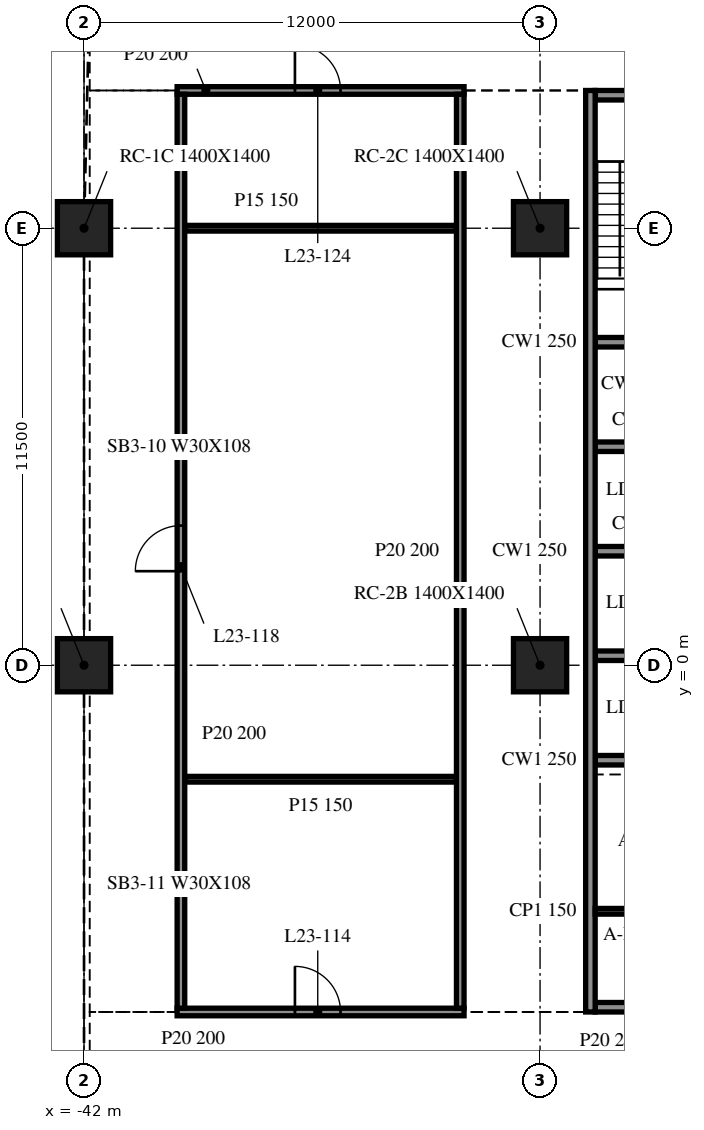
"""IFC4 building model, lengths in metres.
Left out: names, types, materials, properties, quantities, classifications, styles, units other than length and angle.
Written with IfcOpenShell. Run it as: python <this file> out.ifc"""

import sys

from ifc_helpers import new_model, si_unit, direction, frame, frame_2d, origin, origin_2d, place, context, subcontext, project, spatial, rectangle, extrude, element, fill, save


model = new_model("IFC4")
c1 = context("Model", 3, precision=1e-05, world=origin(), true_north=direction((0.0, 1.0)))
c2 = subcontext(c1, "Body", "Model", "MODEL_VIEW")
j1 = project(units=[si_unit("LENGTHUNIT", "METRE"), si_unit("PLANEANGLEUNIT", "RADIAN")], contexts=[c1])
p1 = place(None, origin())
s1 = spatial("IfcSite", under=j1, at=p1, CompositionType="ELEMENT")
p2 = place(p1, origin())
s2 = spatial("IfcBuilding", under=s1, at=p2, CompositionType="ELEMENT")
p3 = place(p2, frame((0.0, 0.0, 101.2)))
s3 = spatial("IfcBuildingStorey", under=s2, at=p3, CompositionType="ELEMENT", Elevation=101.2)
for number, where, z_axis, x_axis in (
    (1, (-42.0, 0.0, -0.34), (0.0, 0.0, 1.0), (1.0, 0.0, 0.0)),
    (2, (-42.0, 11.5, -0.34), (0.0, 0.0, 1.0), (1.0, 0.0, 0.0)),
    (3, (-30.0, 0.0, -0.34), (0.0, 0.0, 1.0), (1.0, 0.0, 0.0)),
    (4, (-30.0, 11.5, -0.34), (0.0, 0.0, 1.0), (1.0, 0.0, 0.0)),
):
    element("IfcColumn", number, at=place(p3, frame(where, z_axis=z_axis, x_axis=x_axis)), inside=s3, PredefinedType="COLUMN", context=c2, shape_type="SweptSolid", body=[
        extrude(rectangle(XDim=1.4, YDim=1.4, at=origin_2d()), origin(), (0.0, 0.0, 1.0), 4.1),
    ])
p4 = place(p3, frame((-28.675, 15.125, 0.0), z_axis=(0.0, 0.0, 1.0), x_axis=(0.0, -1.0, 0.0)))
e5 = element("IfcWall", 5, at=p4, inside=s3, PredefinedType="SOLIDWALL", context=c2, shape_type="SweptSolid", body=[
    extrude(rectangle(XDim=24.25, YDim=0.25, at=frame_2d((12.125, 0.0))), origin(), (0.0, 0.0, 1.0), 3.76),
])
p5 = place(p3, frame((-19.45, -9.0, 0.0), z_axis=(0.0, 0.0, 1.0), x_axis=(-1.0, 0.0, 0.0)))
e6 = element("IfcWall", 6, at=p5, inside=s3, PredefinedType="SOLIDWALL", context=c2, shape_type="SweptSolid", body=[
    extrude(rectangle(XDim=9.1, YDim=0.25, at=frame_2d((4.55, 0.0))), origin(), (0.0, 0.0, 1.0), 3.76),
])
p6 = place(p5, frame((3.65, 0.0, 0.0)))
e7 = element("IfcOpeningElement", 7, at=p6, cuts=e6, PredefinedType="OPENING", context=c2, shape_type="SweptSolid", body=[
    extrude(rectangle(XDim=1.8, YDim=2.1, at=frame_2d((0.9, 1.05))), frame((0.0, 0.135, 0.0), z_axis=(0.0, -1.0, 0.0), x_axis=(1.0, 0.0, 0.0)), (0.0, 0.0, 1.0), 0.27),
])
p7 = place(p3, frame((-28.55, 15.0, 0.0), z_axis=(0.0, 0.0, 1.0), x_axis=(1.0, 0.0, 0.0)))
e8 = element("IfcWall", 8, at=p7, inside=s3, PredefinedType="SOLIDWALL", context=c2, shape_type="SweptSolid", body=[
    extrude(rectangle(XDim=9.1, YDim=0.25, at=frame_2d((4.55, 0.0))), origin(), (0.0, 0.0, 1.0), 3.76),
])
p8 = place(p7, frame((3.65, 0.0, 0.0)))
e9 = element("IfcOpeningElement", 9, at=p8, cuts=e8, PredefinedType="OPENING", context=c2, shape_type="SweptSolid", body=[
    extrude(rectangle(XDim=1.8, YDim=2.1, at=frame_2d((0.9, 1.05))), frame((0.0, 0.135, 0.0), z_axis=(0.0, -1.0, 0.0), x_axis=(1.0, 0.0, 0.0)), (0.0, 0.0, 1.0), 0.27),
])
for number, where, z_axis, x_axis in (
    (10, (-28.55, -2.5, 0.0), (0.0, 0.0, 1.0), (1.0, 0.0, 0.0)),
    (11, (-28.55, 0.25, 0.0), (0.0, 0.0, 1.0), (1.0, 0.0, 0.0)),
    (12, (-28.55, 3.0, 0.0), (0.0, 0.0, 1.0), (1.0, 0.0, 0.0)),
    (13, (-28.55, 5.75, 0.0), (0.0, 0.0, 1.0), (1.0, 0.0, 0.0)),
    (14, (-28.55, 8.5, 0.0), (0.0, 0.0, 1.0), (1.0, 0.0, 0.0)),
):
    element("IfcWall", number, at=place(p3, frame(where, z_axis=z_axis, x_axis=x_axis)), inside=s3, PredefinedType="SOLIDWALL", context=c2, shape_type="SweptSolid", body=[
        extrude(rectangle(XDim=2.85, YDim=0.25, at=frame_2d((1.425, 0.0))), origin(), (0.0, 0.0, 1.0), 3.76),
    ])
p9 = place(p3, frame((-28.55, -6.475, 0.0), z_axis=(0.0, 0.0, 1.0), x_axis=(1.0, 0.0, 0.0)))
e15 = element("IfcWall", 15, at=p9, inside=s3, PredefinedType="PARTITIONING", context=c2, shape_type="SweptSolid", body=[
    extrude(rectangle(XDim=2.85, YDim=0.15, at=frame_2d((1.425, 0.0))), origin(), (0.0, 0.0, 1.0), 3.76),
])
p10 = place(p3, frame((-39.55, -9.125, 0.0), z_axis=(0.0, 0.0, 1.0), x_axis=(1.0, 0.0, 0.0)))
e16 = element("IfcWall", 16, at=p10, inside=s3, PredefinedType="PARTITIONING", context=c2, shape_type="SweptSolid", body=[
    extrude(rectangle(XDim=7.55, YDim=0.2, at=frame_2d((3.775, 0.0))), origin(), (0.0, 0.0, 1.0), 3.76),
])
p11 = place(p10, frame((3.1, 0.0, 0.0)))
e17 = element("IfcOpeningElement", 17, at=p11, cuts=e16, PredefinedType="OPENING", context=c2, shape_type="SweptSolid", body=[
    extrude(rectangle(XDim=1.2, YDim=2.1, at=frame_2d((0.6, 1.05))), frame((0.0, 0.11, 0.0), z_axis=(0.0, -1.0, 0.0), x_axis=(1.0, 0.0, 0.0)), (0.0, 0.0, 1.0), 0.22),
])
for number, where, z_axis, x_axis in (
    (18, (-39.35, -3.0, 0.0), (0.0, 0.0, 1.0), (1.0, 0.0, 0.0)),
    (19, (-39.35, 11.5, 0.0), (0.0, 0.0, 1.0), (1.0, 0.0, 0.0)),
):
    element("IfcWall", number, at=place(p3, frame(where, z_axis=z_axis, x_axis=x_axis)), inside=s3, PredefinedType="PARTITIONING", context=c2, shape_type="SweptSolid", body=[
        extrude(rectangle(XDim=7.15, YDim=0.15, at=frame_2d((3.575, 0.0))), origin(), (0.0, 0.0, 1.0), 3.76),
    ])
p12 = place(p3, frame((-39.55, 15.125, 0.0), z_axis=(0.0, 0.0, 1.0), x_axis=(1.0, 0.0, 0.0)))
e20 = element("IfcWall", 20, at=p12, inside=s3, PredefinedType="PARTITIONING", context=c2, shape_type="SweptSolid", body=[
    extrude(rectangle(XDim=7.55, YDim=0.2, at=frame_2d((3.775, 0.0))), origin(), (0.0, 0.0, 1.0), 3.76),
])
p13 = place(p12, frame((3.1, 0.0, 0.0)))
e21 = element("IfcOpeningElement", 21, at=p13, cuts=e20, PredefinedType="OPENING", context=c2, shape_type="SweptSolid", body=[
    extrude(rectangle(XDim=1.2, YDim=2.1, at=frame_2d((0.6, 1.05))), frame((0.0, 0.11, 0.0), z_axis=(0.0, -1.0, 0.0), x_axis=(1.0, 0.0, 0.0)), (0.0, 0.0, 1.0), 0.22),
])
p14 = place(p3, frame((-39.45, -9.025, 0.0), z_axis=(0.0, 0.0, 1.0), x_axis=(0.0, 1.0, 0.0)))
e22 = element("IfcWall", 22, at=p14, inside=s3, PredefinedType="PARTITIONING", context=c2, shape_type="SweptSolid", body=[
    extrude(rectangle(XDim=24.05, YDim=0.2, at=frame_2d((12.025, 0.0))), origin(), (0.0, 0.0, 1.0), 3.76),
])
p15 = place(p14, frame((11.5, 0.0, 0.0)))
e23 = element("IfcOpeningElement", 23, at=p15, cuts=e22, PredefinedType="OPENING", context=c2, shape_type="SweptSolid", body=[
    extrude(rectangle(XDim=1.2, YDim=2.1, at=frame_2d((0.6, 1.05))), frame((0.0, 0.11, 0.0), z_axis=(0.0, -1.0, 0.0), x_axis=(1.0, 0.0, 0.0)), (0.0, 0.0, 1.0), 0.22),
])
p16 = place(p3, frame((-32.1, -9.025, 0.0), z_axis=(0.0, 0.0, 1.0), x_axis=(0.0, 1.0, 0.0)))
e24 = element("IfcWall", 24, at=p16, inside=s3, PredefinedType="PARTITIONING", context=c2, shape_type="SweptSolid", body=[
    extrude(rectangle(XDim=24.05, YDim=0.2, at=frame_2d((12.025, 0.0))), origin(), (0.0, 0.0, 1.0), 3.76),
])
p17 = place(p11, origin())
e25 = element("IfcDoor", 25, at=p17, inside=s3, OperationType="SINGLE_SWING_LEFT", PredefinedType="DOOR", context=c2, shape_type="SweptSolid", body=[
    extrude(rectangle(XDim=1.2, YDim=2.1, at=frame_2d((0.6, 1.05))), frame((0.0, 0.025, 0.0), z_axis=(0.0, -1.0, 0.0), x_axis=(1.0, 0.0, 0.0)), (0.0, 0.0, 1.0), 0.05),
])
fill(e17, e25)
p18 = place(p15, origin())
e26 = element("IfcDoor", 26, at=p18, inside=s3, OperationType="SINGLE_SWING_LEFT", PredefinedType="DOOR", context=c2, shape_type="SweptSolid", body=[
    extrude(rectangle(XDim=1.2, YDim=2.1, at=frame_2d((0.6, 1.05))), frame((0.0, 0.025, 0.0), z_axis=(0.0, -1.0, 0.0), x_axis=(1.0, 0.0, 0.0)), (0.0, 0.0, 1.0), 0.05),
])
fill(e23, e26)
p19 = place(p13, origin())
e27 = element("IfcDoor", 27, at=p19, inside=s3, OperationType="SINGLE_SWING_RIGHT", PredefinedType="DOOR", context=c2, shape_type="SweptSolid", body=[
    extrude(rectangle(XDim=1.2, YDim=2.1, at=frame_2d((0.6, 1.05))), frame((0.0, 0.025, 0.0), z_axis=(0.0, -1.0, 0.0), x_axis=(1.0, 0.0, 0.0)), (0.0, 0.0, 1.0), 0.05),
])
fill(e21, e27)
save(model, sys.argv[1])
